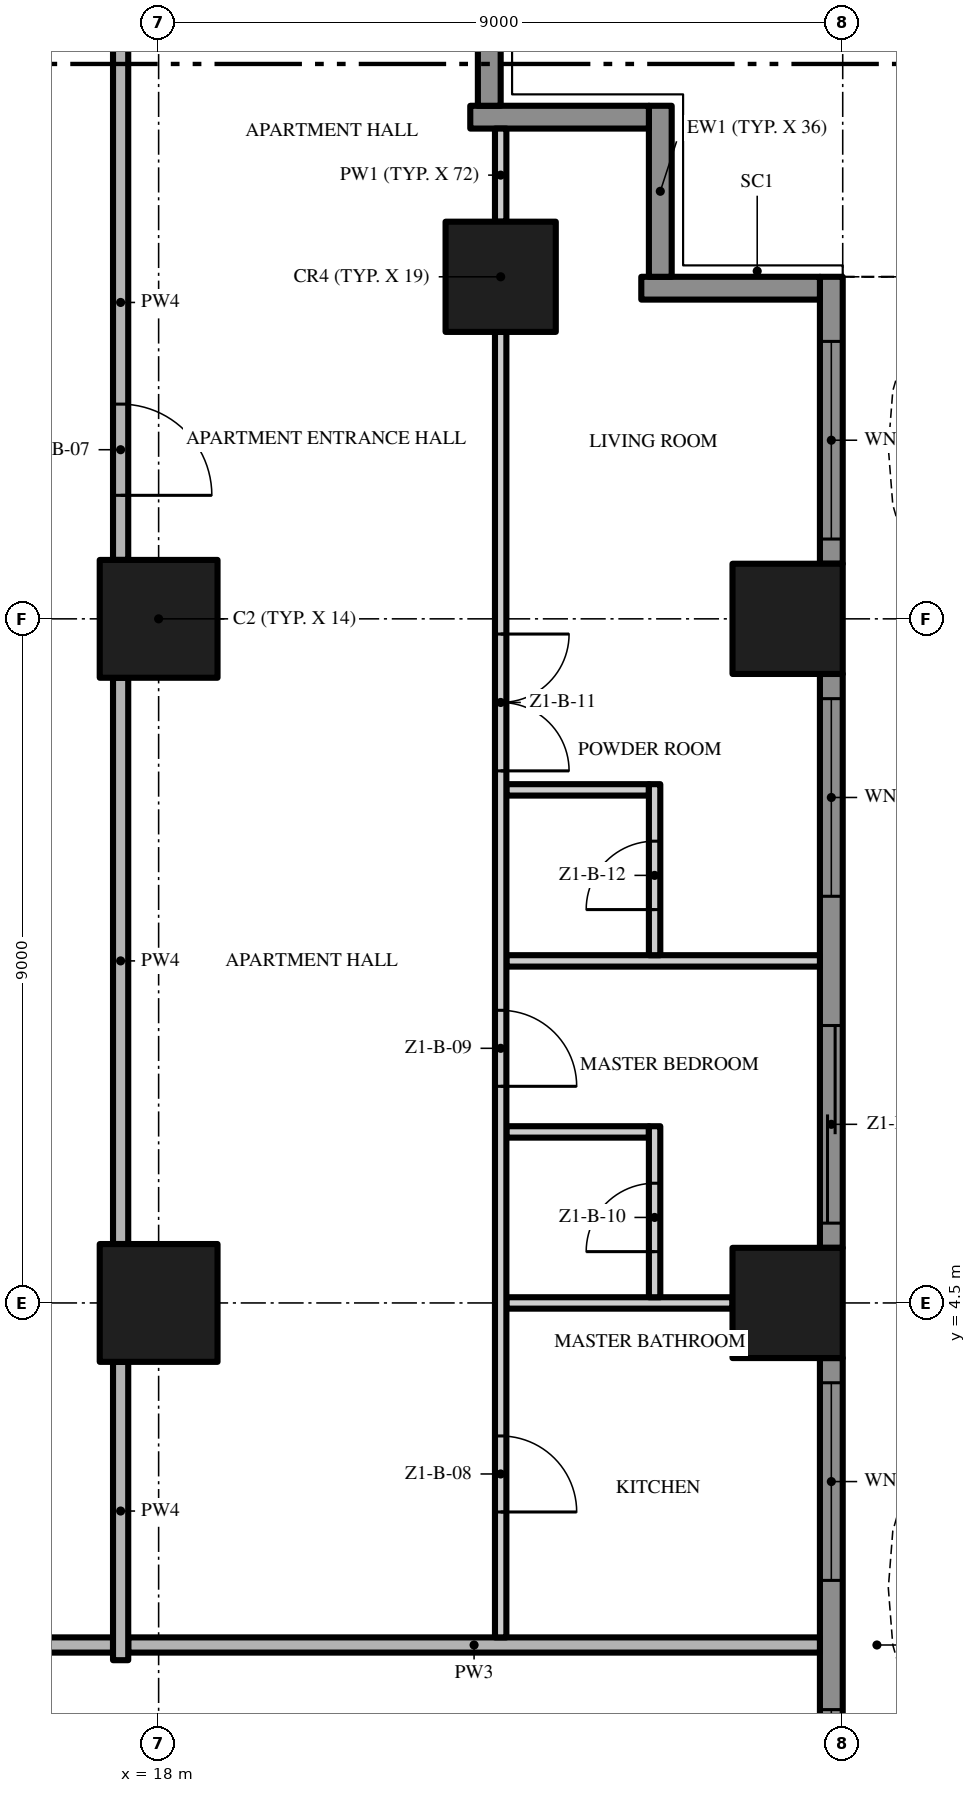
"""IFC4 building model, lengths in metres.
Left out: names, types, materials, properties, quantities, classifications, styles, units other than length and angle.
Written with IfcOpenShell. Run it as: python <this file> out.ifc"""

import sys

from ifc_helpers import new_model, si_unit, direction, frame, frame_2d, origin, origin_2d, place, context, subcontext, project, spatial, polyline, rectangle, outline, extrude, element, fill, save


model = new_model("IFC4")
c1 = context("Model", 3, precision=1e-05, world=origin(), true_north=direction((0.0, 1.0)))
c2 = subcontext(c1, "Body", "Model", "MODEL_VIEW")
j1 = project(units=[si_unit("LENGTHUNIT", "METRE"), si_unit("PLANEANGLEUNIT", "RADIAN")], contexts=[c1])
p1 = place(None, origin())
s1 = spatial("IfcSite", under=j1, at=p1, CompositionType="ELEMENT")
p2 = place(p1, origin())
s2 = spatial("IfcBuilding", under=s1, at=p2, CompositionType="ELEMENT")
p3 = place(p2, frame((0.0, 0.0, 30.2)))
s3 = spatial("IfcBuildingStorey", under=s2, at=p3, CompositionType="ELEMENT", Elevation=30.2)
for number, where, z_axis, x_axis in (
    (1, (18.0, 13.5, 0.0), (0.0, 0.0, 1.0), (1.0, 0.0, 0.0)),
    (2, (18.0, 4.5, 0.0), (0.0, 0.0, 1.0), (1.0, 0.0, 0.0)),
):
    element("IfcColumn", number, at=place(p3, frame(where, z_axis=z_axis, x_axis=x_axis)), inside=s3, PredefinedType="COLUMN", context=c2, shape_type="SweptSolid", body=[
        extrude(rectangle(XDim=1.55, YDim=1.55, at=origin_2d()), origin(), (0.0, 0.0, 1.0), 3.5),
    ])
for number, where, z_axis, x_axis in (
    (3, (26.275, 13.5, 0.0), (0.0, 0.0, 1.0), (1.0, 0.0, 0.0)),
    (4, (22.5, 18.0, 0.0), (0.0, 0.0, 1.0), (1.0, 0.0, 0.0)),
    (5, (26.275, 4.5, 0.0), (0.0, 0.0, 1.0), (1.0, 0.0, 0.0)),
):
    element("IfcColumn", number, at=place(p3, frame(where, z_axis=z_axis, x_axis=x_axis)), inside=s3, PredefinedType="COLUMN", context=c2, shape_type="SweptSolid", body=[
        extrude(rectangle(XDim=1.45, YDim=1.45, at=origin_2d()), origin(), (0.0, 0.0, 1.0), 3.5),
    ])
p4 = place(p3, frame((26.85, 3.775, 0.0), z_axis=(0.0, 0.0, 1.0), x_axis=(0.0, -1.0, 0.0)))
e6 = element("IfcWall", 6, at=p4, inside=s3, PredefinedType="SOLIDWALL", context=c2, shape_type="SweptSolid", body=[
    extrude(rectangle(XDim=7.55, YDim=0.3, at=frame_2d((3.775, 0.0))), origin(), (0.0, 0.0, 1.0), 3.5),
])
p5 = place(p4, frame((4.625, 0.0, 0.45)))
e7 = element("IfcOpeningElement", 7, at=p5, cuts=e6, PredefinedType="OPENING", context=c2, shape_type="SweptSolid", body=[
    extrude(rectangle(XDim=2.6, YDim=2.65, at=frame_2d((1.3, 1.325))), frame((0.0, 0.16, 0.0), z_axis=(0.0, -1.0, 0.0), x_axis=(1.0, 0.0, 0.0)), (0.0, 0.0, 1.0), 0.32),
])
p6 = place(p4, frame((0.325, 0.0, 0.45)))
e8 = element("IfcOpeningElement", 8, at=p6, cuts=e6, PredefinedType="OPENING", context=c2, shape_type="SweptSolid", body=[
    extrude(rectangle(XDim=2.6, YDim=2.65, at=frame_2d((1.3, 1.325))), frame((0.0, 0.16, 0.0), z_axis=(0.0, -1.0, 0.0), x_axis=(1.0, 0.0, 0.0)), (0.0, 0.0, 1.0), 0.32),
])
p7 = place(p3, frame((26.85, 12.775, 0.0), z_axis=(0.0, 0.0, 1.0), x_axis=(0.0, -1.0, 0.0)))
e9 = element("IfcWall", 9, at=p7, inside=s3, PredefinedType="SOLIDWALL", context=c2, shape_type="SweptSolid", body=[
    extrude(rectangle(XDim=7.55, YDim=0.3, at=frame_2d((3.775, 0.0))), origin(), (0.0, 0.0, 1.0), 3.5),
])
p8 = place(p7, frame((4.625, 0.0, 0.0)))
e10 = element("IfcOpeningElement", 10, at=p8, cuts=e9, PredefinedType="OPENING", context=c2, shape_type="SweptSolid", body=[
    extrude(rectangle(XDim=2.6, YDim=2.4, at=frame_2d((1.3, 1.2))), frame((0.0, 0.16, 0.0), z_axis=(0.0, -1.0, 0.0), x_axis=(1.0, 0.0, 0.0)), (0.0, 0.0, 1.0), 0.32),
])
p9 = place(p7, frame((0.325, 0.0, 0.45)))
e11 = element("IfcOpeningElement", 11, at=p9, cuts=e9, PredefinedType="OPENING", context=c2, shape_type="SweptSolid", body=[
    extrude(rectangle(XDim=2.6, YDim=2.65, at=frame_2d((1.3, 1.325))), frame((0.0, 0.16, 0.0), z_axis=(0.0, -1.0, 0.0), x_axis=(1.0, 0.0, 0.0)), (0.0, 0.0, 1.0), 0.32),
])
p10 = place(p3, frame((26.85, 18.0, 0.0), z_axis=(0.0, 0.0, 1.0), x_axis=(0.0, -1.0, 0.0)))
e12 = element("IfcWall", 12, at=p10, inside=s3, PredefinedType="SOLIDWALL", context=c2, shape_type="SweptSolid", body=[
    extrude(rectangle(XDim=3.775, YDim=0.3, at=frame_2d((1.887, 0.0))), origin(), (0.0, 0.0, 1.0), 3.5),
])
p11 = place(p10, frame((0.85, 0.0, 0.45)))
e13 = element("IfcOpeningElement", 13, at=p11, cuts=e12, PredefinedType="OPENING", context=c2, shape_type="SweptSolid", body=[
    extrude(rectangle(XDim=2.6, YDim=2.65, at=frame_2d((1.3, 1.325))), frame((0.0, 0.16, 0.0), z_axis=(0.0, -1.0, 0.0), x_axis=(1.0, 0.0, 0.0)), (0.0, 0.0, 1.0), 0.32),
])
p12 = place(p3, frame((24.35, 17.85, 0.0), z_axis=(0.0, 0.0, 1.0), x_axis=(1.0, 0.0, 0.0)))
e14 = element("IfcWall", 14, at=p12, inside=s3, PredefinedType="SOLIDWALL", context=c2, shape_type="SweptSolid", body=[
    extrude(rectangle(XDim=2.35, YDim=0.3, at=frame_2d((1.175, 0.0))), origin(), (0.0, 0.0, 1.0), 3.5),
])
p13 = place(p3, frame((24.6, 20.25, 0.0), z_axis=(0.0, 0.0, 1.0), x_axis=(0.0, -1.0, 0.0)))
e15 = element("IfcWall", 15, at=p13, inside=s3, PredefinedType="SOLIDWALL", context=c2, shape_type="SweptSolid", body=[
    extrude(rectangle(XDim=2.25, YDim=0.3, at=frame_2d((1.125, 0.0))), origin(), (0.0, 0.0, 1.0), 3.5),
])
p14 = place(p3, frame((22.1, 20.1, 0.0), z_axis=(0.0, 0.0, 1.0), x_axis=(1.0, 0.0, 0.0)))
e16 = element("IfcWall", 16, at=p14, inside=s3, PredefinedType="SOLIDWALL", context=c2, shape_type="SweptSolid", body=[
    extrude(rectangle(XDim=2.35, YDim=0.3, at=frame_2d((1.175, 0.0))), origin(), (0.0, 0.0, 1.0), 3.5),
])
p15 = place(p3, frame((22.35, 22.5, 0.0), z_axis=(0.0, 0.0, 1.0), x_axis=(0.0, -1.0, 0.0)))
e17 = element("IfcWall", 17, at=p15, inside=s3, PredefinedType="SOLIDWALL", context=c2, shape_type="SweptSolid", body=[
    extrude(rectangle(XDim=2.25, YDim=0.3, at=frame_2d((1.125, 0.0))), origin(), (0.0, 0.0, 1.0), 3.5),
])
p16 = place(p3, origin())
e18 = element("IfcWall", 18, at=p16, inside=s3, PredefinedType="USERDEFINED", context=c2, shape_type="SweptSolid", body=[
    extrude(outline(polyline([(28.8, -18.0), (28.095, -16.5), (27.659, -15.0), (27.6, -14.25), (27.659, -13.5), (28.095, -12.0), (28.8, -10.5), (29.505, -9.0), (29.941, -7.5), (30.0, -6.75), (29.941, -6.0), (29.505, -4.5), (28.8, -3.0), (28.095, -1.5), (27.659, 0.0), (27.6, 0.75), (27.659, 1.5), (28.095, 3.0), (28.8, 4.5), (29.505, 6.0), (29.941, 7.5), (30.0, 8.25), (29.941, 9.0), (29.505, 10.5), (28.8, 12.0), (28.095, 13.5), (27.659, 15.0), (27.6, 15.75), (27.659, 16.5), (28.095, 18.0), (27.855, 18.07), (27.411, 16.545), (27.349, 15.75), (27.411, 14.955), (27.86, 13.411), (28.574, 11.894), (29.271, 10.411), (29.694, 8.955), (29.749, 8.25), (29.694, 7.545), (29.271, 6.089), (28.574, 4.606), (27.86, 3.089), (27.411, 1.545), (27.349, 0.75), (27.411, -0.045), (27.86, -1.589), (28.574, -3.106), (29.271, -4.589), (29.694, -6.045), (29.749, -6.75), (29.694, -7.455), (29.271, -8.911), (28.574, -10.394), (27.86, -11.911), (27.411, -13.455), (27.349, -14.25), (27.411, -15.045), (27.86, -16.589), (28.574, -18.106), (28.8, -18.0)])), origin(), (0.0, 0.0, 1.0), 0.9),
])
p17 = place(p3, frame((17.4, 0.0, 0.0), z_axis=(0.0, 0.0, 1.0), x_axis=(-1.0, 0.0, 0.0)))
e19 = element("IfcWall", 19, at=p17, inside=s3, PredefinedType="PARTITIONING", context=c2, shape_type="SweptSolid", body=[
    extrude(rectangle(XDim=17.3, YDim=0.2, at=frame_2d((8.65, 0.0))), origin(), (0.0, 0.0, 1.0), 3.5),
])
p18 = place(p17, frame((7.65, 0.0, 0.0)))
e20 = element("IfcOpeningElement", 20, at=p18, cuts=e19, PredefinedType="OPENING", context=c2, shape_type="SweptSolid", body=[
    extrude(rectangle(XDim=1.5, YDim=2.4, at=frame_2d((0.75, 1.2))), frame((0.0, 0.11, 0.0), z_axis=(0.0, -1.0, 0.0), x_axis=(1.0, 0.0, 0.0)), (0.0, 0.0, 1.0), 0.22),
])
p19 = place(p3, frame((17.6, 0.0, 0.0), z_axis=(0.0, 0.0, 1.0), x_axis=(1.0, 0.0, 0.0)))
e21 = element("IfcWall", 21, at=p19, inside=s3, PredefinedType="PARTITIONING", context=c2, shape_type="SweptSolid", body=[
    extrude(rectangle(XDim=9.1, YDim=0.2, at=frame_2d((4.55, 0.0))), origin(), (0.0, 0.0, 1.0), 3.5),
])
p20 = place(p3, frame((22.575, 4.5, 0.0), z_axis=(0.0, 0.0, 1.0), x_axis=(1.0, 0.0, 0.0)))
e22 = element("IfcWall", 22, at=p20, inside=s3, PredefinedType="PARTITIONING", context=c2, shape_type="SweptSolid", body=[
    extrude(rectangle(XDim=2.975, YDim=0.15, at=frame_2d((1.488, 0.0))), origin(), (0.0, 0.0, 1.0), 3.5),
])
p21 = place(p3, frame((22.575, 6.75, 0.0), z_axis=(0.0, 0.0, 1.0), x_axis=(1.0, 0.0, 0.0)))
e23 = element("IfcWall", 23, at=p21, inside=s3, PredefinedType="PARTITIONING", context=c2, shape_type="SweptSolid", body=[
    extrude(rectangle(XDim=1.875, YDim=0.15, at=frame_2d((0.938, 0.0))), origin(), (0.0, 0.0, 1.0), 3.5),
])
p22 = place(p3, frame((22.575, 9.0, 0.0), z_axis=(0.0, 0.0, 1.0), x_axis=(1.0, 0.0, 0.0)))
e24 = element("IfcWall", 24, at=p22, inside=s3, PredefinedType="PARTITIONING", context=c2, shape_type="SweptSolid", body=[
    extrude(rectangle(XDim=4.125, YDim=0.15, at=frame_2d((2.062, 0.0))), origin(), (0.0, 0.0, 1.0), 3.5),
])
p23 = place(p3, frame((22.575, 11.25, 0.0), z_axis=(0.0, 0.0, 1.0), x_axis=(1.0, 0.0, 0.0)))
e25 = element("IfcWall", 25, at=p23, inside=s3, PredefinedType="PARTITIONING", context=c2, shape_type="SweptSolid", body=[
    extrude(rectangle(XDim=1.875, YDim=0.15, at=frame_2d((0.938, 0.0))), origin(), (0.0, 0.0, 1.0), 3.5),
])
p24 = place(p3, frame((17.5, -0.2, 0.0), z_axis=(0.0, 0.0, 1.0), x_axis=(0.0, 1.0, 0.0)))
e26 = element("IfcWall", 26, at=p24, inside=s3, PredefinedType="PARTITIONING", context=c2, shape_type="SweptSolid", body=[
    extrude(rectangle(XDim=3.925, YDim=0.2, at=frame_2d((1.962, 0.0))), origin(), (0.0, 0.0, 1.0), 3.5),
])
p25 = place(p3, frame((17.5, 5.275, 0.0), z_axis=(0.0, 0.0, 1.0), x_axis=(0.0, 1.0, 0.0)))
e27 = element("IfcWall", 27, at=p25, inside=s3, PredefinedType="PARTITIONING", context=c2, shape_type="SweptSolid", body=[
    extrude(rectangle(XDim=7.45, YDim=0.2, at=frame_2d((3.725, 0.0))), origin(), (0.0, 0.0, 1.0), 3.5),
])
p26 = place(p3, frame((17.5, 21.05, 0.0), z_axis=(0.0, 0.0, 1.0), x_axis=(0.0, -1.0, 0.0)))
e28 = element("IfcWall", 28, at=p26, inside=s3, PredefinedType="PARTITIONING", context=c2, shape_type="SweptSolid", body=[
    extrude(rectangle(XDim=6.775, YDim=0.2, at=frame_2d((3.388, 0.0))), origin(), (0.0, 0.0, 1.0), 3.5),
])
p27 = place(p26, frame((4.725, 0.0, 0.0)))
e29 = element("IfcOpeningElement", 29, at=p27, cuts=e28, PredefinedType="OPENING", context=c2, shape_type="SweptSolid", body=[
    extrude(rectangle(XDim=1.2, YDim=2.4, at=frame_2d((0.6, 1.2))), frame((0.0, 0.11, 0.0), z_axis=(0.0, -1.0, 0.0), x_axis=(1.0, 0.0, 0.0)), (0.0, 0.0, 1.0), 0.22),
])
p28 = place(p3, frame((22.5, 17.275, 0.0), z_axis=(0.0, 0.0, 1.0), x_axis=(0.0, -1.0, 0.0)))
e30 = element("IfcWall", 30, at=p28, inside=s3, PredefinedType="PARTITIONING", context=c2, shape_type="SweptSolid", body=[
    extrude(rectangle(XDim=17.175, YDim=0.15, at=frame_2d((8.588, 0.0))), origin(), (0.0, 0.0, 1.0), 3.5),
])
p29 = place(p28, frame((14.525, 0.0, 0.0)))
e31 = element("IfcOpeningElement", 31, at=p29, cuts=e30, PredefinedType="OPENING", context=c2, shape_type="SweptSolid", body=[
    extrude(rectangle(XDim=1.0, YDim=2.4, at=frame_2d((0.5, 1.2))), frame((0.0, 0.085, 0.0), z_axis=(0.0, -1.0, 0.0), x_axis=(1.0, 0.0, 0.0)), (0.0, 0.0, 1.0), 0.17),
])
p30 = place(p28, frame((8.925, 0.0, 0.0)))
e32 = element("IfcOpeningElement", 32, at=p30, cuts=e30, PredefinedType="OPENING", context=c2, shape_type="SweptSolid", body=[
    extrude(rectangle(XDim=1.0, YDim=2.4, at=frame_2d((0.5, 1.2))), frame((0.0, 0.085, 0.0), z_axis=(0.0, -1.0, 0.0), x_axis=(1.0, 0.0, 0.0)), (0.0, 0.0, 1.0), 0.17),
])
p31 = place(p28, frame((3.975, 0.0, 0.0)))
e33 = element("IfcOpeningElement", 33, at=p31, cuts=e30, PredefinedType="OPENING", context=c2, shape_type="SweptSolid", body=[
    extrude(rectangle(XDim=1.8, YDim=2.4, at=frame_2d((0.9, 1.2))), frame((0.0, 0.085, 0.0), z_axis=(0.0, -1.0, 0.0), x_axis=(1.0, 0.0, 0.0)), (0.0, 0.0, 1.0), 0.17),
])
p32 = place(p3, frame((22.5, 18.725, 0.0), z_axis=(0.0, 0.0, 1.0), x_axis=(0.0, 1.0, 0.0)))
e34 = element("IfcWall", 34, at=p32, inside=s3, PredefinedType="PARTITIONING", context=c2, shape_type="SweptSolid", body=[
    extrude(rectangle(XDim=1.225, YDim=0.15, at=frame_2d((0.613, 0.0))), origin(), (0.0, 0.0, 1.0), 3.5),
])
p33 = place(p3, frame((24.525, 4.575, 0.0), z_axis=(0.0, 0.0, 1.0), x_axis=(0.0, 1.0, 0.0)))
e35 = element("IfcWall", 35, at=p33, inside=s3, PredefinedType="PARTITIONING", context=c2, shape_type="SweptSolid", body=[
    extrude(rectangle(XDim=2.25, YDim=0.15, at=frame_2d((1.125, 0.0))), origin(), (0.0, 0.0, 1.0), 3.5),
])
p34 = place(p33, frame((0.6, 0.0, 0.0)))
e36 = element("IfcOpeningElement", 36, at=p34, cuts=e35, PredefinedType="OPENING", context=c2, shape_type="SweptSolid", body=[
    extrude(rectangle(XDim=0.9, YDim=2.1, at=frame_2d((0.45, 1.05))), frame((0.0, 0.085, 0.0), z_axis=(0.0, -1.0, 0.0), x_axis=(1.0, 0.0, 0.0)), (0.0, 0.0, 1.0), 0.17),
])
p35 = place(p3, frame((24.525, 9.075, 0.0), z_axis=(0.0, 0.0, 1.0), x_axis=(0.0, 1.0, 0.0)))
e37 = element("IfcWall", 37, at=p35, inside=s3, PredefinedType="PARTITIONING", context=c2, shape_type="SweptSolid", body=[
    extrude(rectangle(XDim=2.25, YDim=0.15, at=frame_2d((1.125, 0.0))), origin(), (0.0, 0.0, 1.0), 3.5),
])
p36 = place(p35, frame((0.6, 0.0, 0.0)))
e38 = element("IfcOpeningElement", 38, at=p36, cuts=e37, PredefinedType="OPENING", context=c2, shape_type="SweptSolid", body=[
    extrude(rectangle(XDim=0.9, YDim=2.1, at=frame_2d((0.45, 1.05))), frame((0.0, 0.085, 0.0), z_axis=(0.0, -1.0, 0.0), x_axis=(1.0, 0.0, 0.0)), (0.0, 0.0, 1.0), 0.17),
])
p37 = place(p5, origin())
e39 = element("IfcWindow", 39, at=p37, inside=s3, PartitioningType="SINGLE_PANEL", PredefinedType="WINDOW", context=c2, shape_type="SweptSolid", body=[
    extrude(rectangle(XDim=2.6, YDim=2.65, at=frame_2d((1.3, 1.325))), frame((0.0, 0.03, 0.0), z_axis=(0.0, -1.0, 0.0), x_axis=(1.0, 0.0, 0.0)), (0.0, 0.0, 1.0), 0.06),
])
fill(e7, e39)
p38 = place(p6, origin())
e40 = element("IfcWindow", 40, at=p38, inside=s3, PartitioningType="SINGLE_PANEL", PredefinedType="WINDOW", context=c2, shape_type="SweptSolid", body=[
    extrude(rectangle(XDim=2.6, YDim=2.65, at=frame_2d((1.3, 1.325))), frame((0.0, 0.03, 0.0), z_axis=(0.0, -1.0, 0.0), x_axis=(1.0, 0.0, 0.0)), (0.0, 0.0, 1.0), 0.06),
])
fill(e8, e40)
p39 = place(p8, origin())
e41 = element("IfcDoor", 41, at=p39, inside=s3, OperationType="SINGLE_SWING_LEFT", PredefinedType="DOOR", context=c2, shape_type="SweptSolid", body=[
    extrude(rectangle(XDim=2.6, YDim=2.4, at=frame_2d((1.3, 1.2))), frame((0.0, 0.025, 0.0), z_axis=(0.0, -1.0, 0.0), x_axis=(1.0, 0.0, 0.0)), (0.0, 0.0, 1.0), 0.05),
])
fill(e10, e41)
p40 = place(p9, origin())
e42 = element("IfcWindow", 42, at=p40, inside=s3, PartitioningType="SINGLE_PANEL", PredefinedType="WINDOW", context=c2, shape_type="SweptSolid", body=[
    extrude(rectangle(XDim=2.6, YDim=2.65, at=frame_2d((1.3, 1.325))), frame((0.0, 0.03, 0.0), z_axis=(0.0, -1.0, 0.0), x_axis=(1.0, 0.0, 0.0)), (0.0, 0.0, 1.0), 0.06),
])
fill(e11, e42)
p41 = place(p11, origin())
e43 = element("IfcWindow", 43, at=p41, inside=s3, PartitioningType="SINGLE_PANEL", PredefinedType="WINDOW", context=c2, shape_type="SweptSolid", body=[
    extrude(rectangle(XDim=2.6, YDim=2.65, at=frame_2d((1.3, 1.325))), frame((0.0, 0.03, 0.0), z_axis=(0.0, -1.0, 0.0), x_axis=(1.0, 0.0, 0.0)), (0.0, 0.0, 1.0), 0.06),
])
fill(e13, e43)
p42 = place(p27, origin())
e44 = element("IfcDoor", 44, at=p42, inside=s3, OperationType="SINGLE_SWING_RIGHT", PredefinedType="DOOR", context=c2, shape_type="SweptSolid", body=[
    extrude(rectangle(XDim=1.2, YDim=2.4, at=frame_2d((0.6, 1.2))), frame((0.0, 0.025, 0.0), z_axis=(0.0, -1.0, 0.0), x_axis=(1.0, 0.0, 0.0)), (0.0, 0.0, 1.0), 0.05),
])
fill(e29, e44)
p43 = place(p29, origin())
e45 = element("IfcDoor", 45, at=p43, inside=s3, OperationType="SINGLE_SWING_RIGHT", PredefinedType="DOOR", context=c2, shape_type="SweptSolid", body=[
    extrude(rectangle(XDim=1.0, YDim=2.4, at=frame_2d((0.5, 1.2))), frame((0.0, 0.025, 0.0), z_axis=(0.0, -1.0, 0.0), x_axis=(1.0, 0.0, 0.0)), (0.0, 0.0, 1.0), 0.05),
])
fill(e31, e45)
p44 = place(p30, origin())
e46 = element("IfcDoor", 46, at=p44, inside=s3, OperationType="SINGLE_SWING_RIGHT", PredefinedType="DOOR", context=c2, shape_type="SweptSolid", body=[
    extrude(rectangle(XDim=1.0, YDim=2.4, at=frame_2d((0.5, 1.2))), frame((0.0, 0.025, 0.0), z_axis=(0.0, -1.0, 0.0), x_axis=(1.0, 0.0, 0.0)), (0.0, 0.0, 1.0), 0.05),
])
fill(e32, e46)
p45 = place(p34, origin())
e47 = element("IfcDoor", 47, at=p45, inside=s3, OperationType="SINGLE_SWING_LEFT", PredefinedType="DOOR", context=c2, shape_type="SweptSolid", body=[
    extrude(rectangle(XDim=0.9, YDim=2.1, at=frame_2d((0.45, 1.05))), frame((0.0, 0.025, 0.0), z_axis=(0.0, -1.0, 0.0), x_axis=(1.0, 0.0, 0.0)), (0.0, 0.0, 1.0), 0.05),
])
fill(e36, e47)
p46 = place(p31, origin())
e48 = element("IfcDoor", 48, at=p46, inside=s3, OperationType="DOUBLE_DOOR_SINGLE_SWING", PredefinedType="DOOR", context=c2, shape_type="SweptSolid", body=[
    extrude(rectangle(XDim=1.8, YDim=2.4, at=frame_2d((0.9, 1.2))), frame((0.0, 0.025, 0.0), z_axis=(0.0, -1.0, 0.0), x_axis=(1.0, 0.0, 0.0)), (0.0, 0.0, 1.0), 0.05),
])
fill(e33, e48)
p47 = place(p36, origin())
e49 = element("IfcDoor", 49, at=p47, inside=s3, OperationType="SINGLE_SWING_LEFT", PredefinedType="DOOR", context=c2, shape_type="SweptSolid", body=[
    extrude(rectangle(XDim=0.9, YDim=2.1, at=frame_2d((0.45, 1.05))), frame((0.0, 0.025, 0.0), z_axis=(0.0, -1.0, 0.0), x_axis=(1.0, 0.0, 0.0)), (0.0, 0.0, 1.0), 0.05),
])
fill(e38, e49)
save(model, sys.argv[1])
